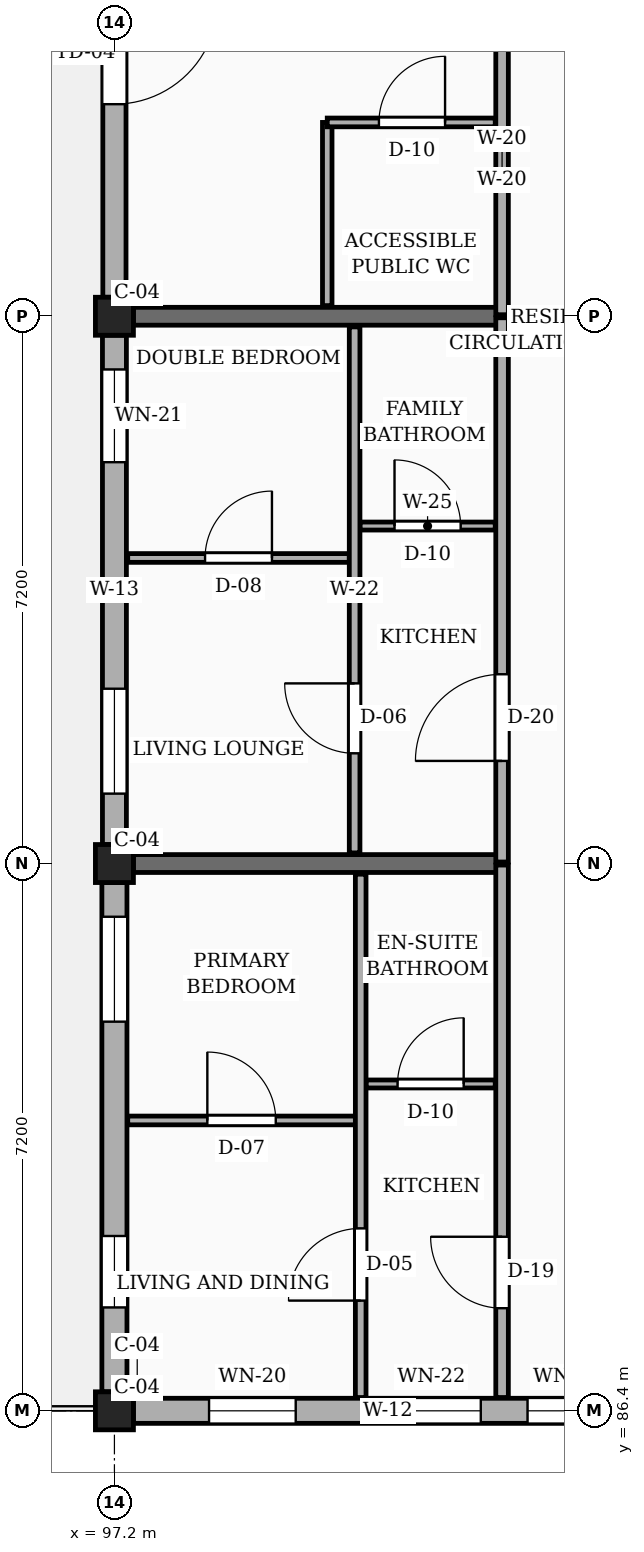
"""IFC4 building model, lengths in metres.
Left out: names, types, materials, properties, quantities, classifications, styles, units other than length and angle.
Written with IfcOpenShell. Run it as: python <this file> out.ifc"""

import sys

from ifc_helpers import new_model, si_unit, direction, frame, frame_2d, origin, origin_2d, place, context, subcontext, project, spatial, rectangle, extrude, element, fill, save


model = new_model("IFC4")
c1 = context("Model", 3, precision=1e-05, world=origin(), true_north=direction((0.0, 1.0)))
c2 = subcontext(c1, "Body", "Model", "MODEL_VIEW")
j1 = project(units=[si_unit("LENGTHUNIT", "METRE"), si_unit("PLANEANGLEUNIT", "RADIAN")], contexts=[c1])
p1 = place(None, origin())
s1 = spatial("IfcSite", under=j1, at=p1, CompositionType="ELEMENT")
p2 = place(p1, origin())
s2 = spatial("IfcBuilding", under=s1, at=p2, CompositionType="ELEMENT")
p3 = place(p2, frame((0.0, 0.0, 23.4)))
s3 = spatial("IfcBuildingStorey", under=s2, at=p3, CompositionType="ELEMENT", Elevation=23.4)
for number, where, z_axis, x_axis in (
    (1, (97.2, 86.4, 0.0), (0.0, 0.0, 1.0), (1.0, 0.0, 0.0)),
    (2, (97.2, 93.6, 0.0), (0.0, 0.0, 1.0), (1.0, 0.0, 0.0)),
    (3, (97.2, 100.8, 0.0), (0.0, 0.0, 1.0), (1.0, 0.0, 0.0)),
):
    element("IfcColumn", number, at=place(p3, frame(where, z_axis=z_axis, x_axis=x_axis)), inside=s3, PredefinedType="COLUMN", context=c2, shape_type="SweptSolid", body=[
        extrude(rectangle(XDim=0.5, YDim=0.5, at=origin_2d()), origin(), (0.0, 0.0, 1.0), 3.15),
    ])
for number, where, z_axis, x_axis in (
    (4, (97.45, 93.6, 0.0), (0.0, 0.0, 1.0), (1.0, 0.0, 0.0)),
    (5, (97.45, 100.8, 0.0), (0.0, 0.0, 1.0), (1.0, 0.0, 0.0)),
):
    element("IfcWall", number, at=place(p3, frame(where, z_axis=z_axis, x_axis=x_axis)), inside=s3, PredefinedType="SOLIDWALL", context=c2, shape_type="SweptSolid", body=[
        extrude(rectangle(XDim=4.85, YDim=0.235, at=frame_2d((2.425, 0.0))), origin(), (0.0, 0.0, 1.0), 2.19),
    ])
p4 = place(p3, frame((97.45, 86.4, 0.0), z_axis=(0.0, 0.0, 1.0), x_axis=(1.0, 0.0, 0.0)))
e6 = element("IfcWall", 6, at=p4, inside=s3, PredefinedType="SOLIDWALL", context=c2, shape_type="SweptSolid", body=[
    extrude(rectangle(XDim=6.7, YDim=0.33, at=frame_2d((3.35, 0.0))), origin(), (0.0, 0.0, 1.0), 2.46),
])
p5 = place(p4, frame((0.995, 0.0, 0.78)))
e7 = element("IfcOpeningElement", 7, at=p5, cuts=e6, PredefinedType="OPENING", context=c2, shape_type="SweptSolid", body=[
    extrude(rectangle(XDim=1.14, YDim=1.36, at=frame_2d((0.57, 0.68))), frame((0.0, 0.175, 0.0), z_axis=(0.0, -1.0, 0.0), x_axis=(1.0, 0.0, 0.0)), (0.0, 0.0, 1.0), 0.35),
])
p6 = place(p4, frame((3.27, 0.0, 0.78)))
e8 = element("IfcOpeningElement", 8, at=p6, cuts=e6, PredefinedType="OPENING", context=c2, shape_type="SweptSolid", body=[
    extrude(rectangle(XDim=1.3, YDim=1.36, at=frame_2d((0.65, 0.68))), frame((0.0, 0.175, 0.0), z_axis=(0.0, -1.0, 0.0), x_axis=(1.0, 0.0, 0.0)), (0.0, 0.0, 1.0), 0.35),
])
p7 = place(p4, frame((5.185, 0.0, 0.78)))
e9 = element("IfcOpeningElement", 9, at=p7, cuts=e6, PredefinedType="OPENING", context=c2, shape_type="SweptSolid", body=[
    extrude(rectangle(XDim=1.04, YDim=1.26, at=frame_2d((0.52, 0.63))), frame((0.0, 0.175, 0.0), z_axis=(0.0, -1.0, 0.0), x_axis=(1.0, 0.0, 0.0)), (0.0, 0.0, 1.0), 0.35),
])
p8 = place(p3, frame((97.2, 107.75, 0.0), z_axis=(0.0, 0.0, 1.0), x_axis=(0.0, -1.0, 0.0)))
e10 = element("IfcWall", 10, at=p8, inside=s3, PredefinedType="SOLIDWALL", context=c2, shape_type="SweptSolid", body=[
    extrude(rectangle(XDim=6.7, YDim=0.305, at=frame_2d((3.35, 0.0))), origin(), (0.0, 0.0, 1.0), 2.46),
])
p9 = place(p8, frame((2.8, 0.0, 0.0)))
e11 = element("IfcOpeningElement", 11, at=p9, cuts=e10, PredefinedType="OPENING", context=c2, shape_type="SweptSolid", body=[
    extrude(rectangle(XDim=1.36, YDim=2.12, at=frame_2d((0.68, 1.06))), frame((0.0, 0.163, 0.0), z_axis=(0.0, -1.0, 0.0), x_axis=(1.0, 0.0, 0.0)), (0.0, 0.0, 1.0), 0.325),
])
p10 = place(p8, frame((0.65, 0.0, 0.78)))
e12 = element("IfcOpeningElement", 12, at=p10, cuts=e10, PredefinedType="OPENING", context=c2, shape_type="SweptSolid", body=[
    extrude(rectangle(XDim=1.16, YDim=1.15, at=frame_2d((0.58, 0.575))), frame((0.0, 0.163, 0.0), z_axis=(0.0, -1.0, 0.0), x_axis=(1.0, 0.0, 0.0)), (0.0, 0.0, 1.0), 0.325),
])
p11 = place(p3, frame((97.2, 100.55, 0.0), z_axis=(0.0, 0.0, 1.0), x_axis=(0.0, -1.0, 0.0)))
e13 = element("IfcWall", 13, at=p11, inside=s3, PredefinedType="SOLIDWALL", context=c2, shape_type="SweptSolid", body=[
    extrude(rectangle(XDim=6.7, YDim=0.315, at=frame_2d((3.35, 0.0))), origin(), (0.0, 0.0, 1.0), 2.46),
])
p12 = place(p11, frame((0.45, 0.0, 0.78)))
e14 = element("IfcOpeningElement", 14, at=p12, cuts=e13, PredefinedType="OPENING", context=c2, shape_type="SweptSolid", body=[
    extrude(rectangle(XDim=1.22, YDim=1.36, at=frame_2d((0.61, 0.68))), frame((0.0, 0.167, 0.0), z_axis=(0.0, -1.0, 0.0), x_axis=(1.0, 0.0, 0.0)), (0.0, 0.0, 1.0), 0.335),
])
p13 = place(p11, frame((4.65, 0.0, 0.78)))
e15 = element("IfcOpeningElement", 15, at=p13, cuts=e13, PredefinedType="OPENING", context=c2, shape_type="SweptSolid", body=[
    extrude(rectangle(XDim=1.38, YDim=1.36, at=frame_2d((0.69, 0.68))), frame((0.0, 0.167, 0.0), z_axis=(0.0, -1.0, 0.0), x_axis=(1.0, 0.0, 0.0)), (0.0, 0.0, 1.0), 0.335),
])
p14 = place(p3, frame((97.2, 93.35, 0.0), z_axis=(0.0, 0.0, 1.0), x_axis=(0.0, -1.0, 0.0)))
e16 = element("IfcWall", 16, at=p14, inside=s3, PredefinedType="SOLIDWALL", context=c2, shape_type="SweptSolid", body=[
    extrude(rectangle(XDim=6.7, YDim=0.33, at=frame_2d((3.35, 0.0))), origin(), (0.0, 0.0, 1.0), 2.46),
])
p15 = place(p14, frame((0.45, 0.0, 0.78)))
e17 = element("IfcOpeningElement", 17, at=p15, cuts=e16, PredefinedType="OPENING", context=c2, shape_type="SweptSolid", body=[
    extrude(rectangle(XDim=1.38, YDim=1.36, at=frame_2d((0.69, 0.68))), frame((0.0, 0.175, 0.0), z_axis=(0.0, -1.0, 0.0), x_axis=(1.0, 0.0, 0.0)), (0.0, 0.0, 1.0), 0.35),
])
p16 = place(p14, frame((4.65, 0.0, 0.78)))
e18 = element("IfcOpeningElement", 18, at=p16, cuts=e16, PredefinedType="OPENING", context=c2, shape_type="SweptSolid", body=[
    extrude(rectangle(XDim=0.94, YDim=1.44, at=frame_2d((0.47, 0.72))), frame((0.0, 0.175, 0.0), z_axis=(0.0, -1.0, 0.0), x_axis=(1.0, 0.0, 0.0)), (0.0, 0.0, 1.0), 0.35),
])
p17 = place(p3, frame((102.3, 86.575, 0.0), z_axis=(0.0, 0.0, 1.0), x_axis=(0.0, 1.0, 0.0)))
e19 = element("IfcWall", 19, at=p17, inside=s3, PredefinedType="PARTITIONING", context=c2, shape_type="SweptSolid", body=[
    extrude(rectangle(XDim=7.005, YDim=0.165, at=frame_2d((3.502, 0.0))), origin(), (0.0, 0.0, 1.0), 2.325),
])
p18 = place(p17, frame((1.175, 0.0, 0.0)))
e20 = element("IfcOpeningElement", 20, at=p18, cuts=e19, PredefinedType="OPENING", context=c2, shape_type="SweptSolid", body=[
    extrude(rectangle(XDim=0.94, YDim=2.12, at=frame_2d((0.47, 1.06))), frame((0.0, 0.093, 0.0), z_axis=(0.0, -1.0, 0.0), x_axis=(1.0, 0.0, 0.0)), (0.0, 0.0, 1.0), 0.185),
])
p19 = place(p3, frame((102.3, 93.62, 0.0), z_axis=(0.0, 0.0, 1.0), x_axis=(0.0, 1.0, 0.0)))
e21 = element("IfcWall", 21, at=p19, inside=s3, PredefinedType="PARTITIONING", context=c2, shape_type="SweptSolid", body=[
    extrude(rectangle(XDim=7.16, YDim=0.165, at=frame_2d((3.58, 0.0))), origin(), (0.0, 0.0, 1.0), 2.325),
])
p20 = place(p19, frame((1.33, 0.0, 0.0)))
e22 = element("IfcOpeningElement", 22, at=p20, cuts=e21, PredefinedType="OPENING", context=c2, shape_type="SweptSolid", body=[
    extrude(rectangle(XDim=1.14, YDim=2.18, at=frame_2d((0.57, 1.09))), frame((0.0, 0.093, 0.0), z_axis=(0.0, -1.0, 0.0), x_axis=(1.0, 0.0, 0.0)), (0.0, 0.0, 1.0), 0.185),
])
p21 = place(p3, frame((102.3, 100.82, 0.0), z_axis=(0.0, 0.0, 1.0), x_axis=(0.0, 1.0, 0.0)))
e23 = element("IfcWall", 23, at=p21, inside=s3, PredefinedType="PARTITIONING", context=c2, shape_type="SweptSolid", body=[
    extrude(rectangle(XDim=7.16, YDim=0.165, at=frame_2d((3.58, 0.0))), origin(), (0.0, 0.0, 1.0), 2.325),
])
p22 = place(p21, frame((4.33, 0.0, 0.0)))
e24 = element("IfcOpeningElement", 24, at=p22, cuts=e23, PredefinedType="OPENING", context=c2, shape_type="SweptSolid", body=[
    extrude(rectangle(XDim=1.1, YDim=2.15, at=frame_2d((0.55, 1.075))), frame((0.0, 0.093, 0.0), z_axis=(0.0, -1.0, 0.0), x_axis=(1.0, 0.0, 0.0)), (0.0, 0.0, 1.0), 0.185),
])
p23 = place(p3, frame((97.375, 90.22, 0.0), z_axis=(0.0, 0.0, 1.0), x_axis=(1.0, 0.0, 0.0)))
e25 = element("IfcWall", 25, at=p23, inside=s3, PredefinedType="PARTITIONING", context=c2, shape_type="SweptSolid", body=[
    extrude(rectangle(XDim=2.995, YDim=0.115, at=frame_2d((1.498, 0.0))), origin(), (0.0, 0.0, 1.0), 2.325),
])
p24 = place(p23, frame((1.048, 0.0, 0.0)))
e26 = element("IfcOpeningElement", 26, at=p24, cuts=e25, PredefinedType="OPENING", context=c2, shape_type="SweptSolid", body=[
    extrude(rectangle(XDim=0.9, YDim=2.1, at=frame_2d((0.45, 1.05))), frame((0.0, 0.067, 0.0), z_axis=(0.0, -1.0, 0.0), x_axis=(1.0, 0.0, 0.0)), (0.0, 0.0, 1.0), 0.135),
])
p25 = place(p3, frame((100.51, 90.7, 0.0), z_axis=(0.0, 0.0, 1.0), x_axis=(1.0, 0.0, 0.0)))
e27 = element("IfcWall", 27, at=p25, inside=s3, PredefinedType="PARTITIONING", context=c2, shape_type="SweptSolid", body=[
    extrude(rectangle(XDim=1.7, YDim=0.105, at=frame_2d((0.85, 0.0))), origin(), (0.0, 0.0, 1.0), 2.325),
])
p26 = place(p25, frame((0.415, 0.0, 0.0)))
e28 = element("IfcOpeningElement", 28, at=p26, cuts=e27, PredefinedType="OPENING", context=c2, shape_type="SweptSolid", body=[
    extrude(rectangle(XDim=0.87, YDim=2.05, at=frame_2d((0.435, 1.025))), frame((0.0, 0.062, 0.0), z_axis=(0.0, -1.0, 0.0), x_axis=(1.0, 0.0, 0.0)), (0.0, 0.0, 1.0), 0.125),
])
p27 = place(p3, frame((100.44, 86.575, 0.0), z_axis=(0.0, 0.0, 1.0), x_axis=(0.0, 1.0, 0.0)))
e29 = element("IfcWall", 29, at=p27, inside=s3, PredefinedType="PARTITIONING", context=c2, shape_type="SweptSolid", body=[
    extrude(rectangle(XDim=6.885, YDim=0.14, at=frame_2d((3.442, 0.0))), origin(), (0.0, 0.0, 1.0), 2.325),
])
p28 = place(p27, frame((1.275, 0.0, 0.0)))
e30 = element("IfcOpeningElement", 30, at=p28, cuts=e29, PredefinedType="OPENING", context=c2, shape_type="SweptSolid", body=[
    extrude(rectangle(XDim=0.95, YDim=2.1, at=frame_2d((0.475, 1.05))), frame((0.0, 0.08, 0.0), z_axis=(0.0, -1.0, 0.0), x_axis=(1.0, 0.0, 0.0)), (0.0, 0.0, 1.0), 0.16),
])
p29 = place(p3, frame((97.375, 97.62, 0.0), z_axis=(0.0, 0.0, 1.0), x_axis=(1.0, 0.0, 0.0)))
e31 = element("IfcWall", 31, at=p29, inside=s3, PredefinedType="PARTITIONING", context=c2, shape_type="SweptSolid", body=[
    extrude(rectangle(XDim=2.915, YDim=0.115, at=frame_2d((1.458, 0.0))), origin(), (0.0, 0.0, 1.0), 2.325),
])
p30 = place(p29, frame((1.018, 0.0, 0.0)))
e32 = element("IfcOpeningElement", 32, at=p30, cuts=e31, PredefinedType="OPENING", context=c2, shape_type="SweptSolid", body=[
    extrude(rectangle(XDim=0.88, YDim=2.08, at=frame_2d((0.44, 1.04))), frame((0.0, 0.067, 0.0), z_axis=(0.0, -1.0, 0.0), x_axis=(1.0, 0.0, 0.0)), (0.0, 0.0, 1.0), 0.135),
])
p31 = place(p3, frame((100.43, 98.04, 0.0), z_axis=(0.0, 0.0, 1.0), x_axis=(1.0, 0.0, 0.0)))
e33 = element("IfcWall", 33, at=p31, inside=s3, PredefinedType="PARTITIONING", context=c2, shape_type="SweptSolid", body=[
    extrude(rectangle(XDim=1.78, YDim=0.105, at=frame_2d((0.89, 0.0))), origin(), (0.0, 0.0, 1.0), 2.325),
])
p32 = place(p31, frame((0.455, 0.0, 0.0)))
e34 = element("IfcOpeningElement", 34, at=p32, cuts=e33, PredefinedType="OPENING", context=c2, shape_type="SweptSolid", body=[
    extrude(rectangle(XDim=0.87, YDim=2.05, at=frame_2d((0.435, 1.025))), frame((0.0, 0.062, 0.0), z_axis=(0.0, -1.0, 0.0), x_axis=(1.0, 0.0, 0.0)), (0.0, 0.0, 1.0), 0.125),
])
p33 = place(p3, frame((100.36, 93.74, 0.0), z_axis=(0.0, 0.0, 1.0), x_axis=(0.0, 1.0, 0.0)))
e35 = element("IfcWall", 35, at=p33, inside=s3, PredefinedType="PARTITIONING", context=c2, shape_type="SweptSolid", body=[
    extrude(rectangle(XDim=6.92, YDim=0.14, at=frame_2d((3.46, 0.0))), origin(), (0.0, 0.0, 1.0), 2.325),
])
p34 = place(p33, frame((1.31, 0.0, 0.0)))
e36 = element("IfcOpeningElement", 36, at=p34, cuts=e35, PredefinedType="OPENING", context=c2, shape_type="SweptSolid", body=[
    extrude(rectangle(XDim=0.92, YDim=2.1, at=frame_2d((0.46, 1.05))), frame((0.0, 0.08, 0.0), z_axis=(0.0, -1.0, 0.0), x_axis=(1.0, 0.0, 0.0)), (0.0, 0.0, 1.0), 0.16),
])
p35 = place(p3, frame((100.0, 100.94, 0.0), z_axis=(0.0, 0.0, 1.0), x_axis=(0.0, 1.0, 0.0)))
e37 = element("IfcWall", 37, at=p35, inside=s3, PredefinedType="PARTITIONING", context=c2, shape_type="SweptSolid", body=[
    extrude(rectangle(XDim=2.41, YDim=0.125, at=frame_2d((1.205, 0.0))), origin(), (0.0, 0.0, 1.0), 2.325),
])
p36 = place(p3, frame((100.0, 103.35, 0.0), z_axis=(0.0, 0.0, 1.0), x_axis=(1.0, 0.0, 0.0)))
e38 = element("IfcWall", 38, at=p36, inside=s3, PredefinedType="PARTITIONING", context=c2, shape_type="SweptSolid", body=[
    extrude(rectangle(XDim=2.21, YDim=0.115, at=frame_2d((1.105, 0.0))), origin(), (0.0, 0.0, 1.0), 2.325),
])
p37 = place(p36, frame((0.68, 0.0, 0.0)))
e39 = element("IfcOpeningElement", 39, at=p37, cuts=e38, PredefinedType="OPENING", context=c2, shape_type="SweptSolid", body=[
    extrude(rectangle(XDim=0.87, YDim=2.05, at=frame_2d((0.435, 1.025))), frame((0.0, 0.067, 0.0), z_axis=(0.0, -1.0, 0.0), x_axis=(1.0, 0.0, 0.0)), (0.0, 0.0, 1.0), 0.135),
])
p38 = place(p5, origin())
e40 = element("IfcWindow", 40, at=p38, inside=s3, PartitioningType="SINGLE_PANEL", PredefinedType="WINDOW", context=c2, shape_type="SweptSolid", body=[
    extrude(rectangle(XDim=1.14, YDim=1.36, at=frame_2d((0.57, 0.68))), frame((0.0, 0.03, 0.0), z_axis=(0.0, -1.0, 0.0), x_axis=(1.0, 0.0, 0.0)), (0.0, 0.0, 1.0), 0.06),
])
fill(e7, e40)
p39 = place(p6, origin())
e41 = element("IfcWindow", 41, at=p39, inside=s3, PartitioningType="SINGLE_PANEL", PredefinedType="WINDOW", context=c2, shape_type="SweptSolid", body=[
    extrude(rectangle(XDim=1.3, YDim=1.36, at=frame_2d((0.65, 0.68))), frame((0.0, 0.03, 0.0), z_axis=(0.0, -1.0, 0.0), x_axis=(1.0, 0.0, 0.0)), (0.0, 0.0, 1.0), 0.06),
])
fill(e8, e41)
p40 = place(p7, origin())
e42 = element("IfcWindow", 42, at=p40, inside=s3, PartitioningType="SINGLE_PANEL", PredefinedType="WINDOW", context=c2, shape_type="SweptSolid", body=[
    extrude(rectangle(XDim=1.04, YDim=1.26, at=frame_2d((0.52, 0.63))), frame((0.0, 0.03, 0.0), z_axis=(0.0, -1.0, 0.0), x_axis=(1.0, 0.0, 0.0)), (0.0, 0.0, 1.0), 0.06),
])
fill(e9, e42)
p41 = place(p9, frame((1.36, 0.0, 0.0), z_axis=(0.0, 0.0, 1.0), x_axis=(-1.0, 0.0, 0.0)))
e43 = element("IfcDoor", 43, at=p41, inside=s3, OperationType="SINGLE_SWING_LEFT", PredefinedType="DOOR", context=c2, shape_type="SweptSolid", body=[
    extrude(rectangle(XDim=1.36, YDim=2.12, at=frame_2d((0.68, 1.06))), frame((0.0, 0.025, 0.0), z_axis=(0.0, -1.0, 0.0), x_axis=(1.0, 0.0, 0.0)), (0.0, 0.0, 1.0), 0.05),
])
fill(e11, e43)
p42 = place(p12, origin())
e44 = element("IfcWindow", 44, at=p42, inside=s3, PartitioningType="SINGLE_PANEL", PredefinedType="WINDOW", context=c2, shape_type="SweptSolid", body=[
    extrude(rectangle(XDim=1.22, YDim=1.36, at=frame_2d((0.61, 0.68))), frame((0.0, 0.03, 0.0), z_axis=(0.0, -1.0, 0.0), x_axis=(1.0, 0.0, 0.0)), (0.0, 0.0, 1.0), 0.06),
])
fill(e14, e44)
p43 = place(p13, origin())
e45 = element("IfcWindow", 45, at=p43, inside=s3, PartitioningType="SINGLE_PANEL", PredefinedType="WINDOW", context=c2, shape_type="SweptSolid", body=[
    extrude(rectangle(XDim=1.38, YDim=1.36, at=frame_2d((0.69, 0.68))), frame((0.0, 0.03, 0.0), z_axis=(0.0, -1.0, 0.0), x_axis=(1.0, 0.0, 0.0)), (0.0, 0.0, 1.0), 0.06),
])
fill(e15, e45)
p44 = place(p15, origin())
e46 = element("IfcWindow", 46, at=p44, inside=s3, PartitioningType="SINGLE_PANEL", PredefinedType="WINDOW", context=c2, shape_type="SweptSolid", body=[
    extrude(rectangle(XDim=1.38, YDim=1.36, at=frame_2d((0.69, 0.68))), frame((0.0, 0.03, 0.0), z_axis=(0.0, -1.0, 0.0), x_axis=(1.0, 0.0, 0.0)), (0.0, 0.0, 1.0), 0.06),
])
fill(e17, e46)
p45 = place(p16, origin())
e47 = element("IfcWindow", 47, at=p45, inside=s3, PartitioningType="SINGLE_PANEL", PredefinedType="WINDOW", context=c2, shape_type="SweptSolid", body=[
    extrude(rectangle(XDim=0.94, YDim=1.44, at=frame_2d((0.47, 0.72))), frame((0.0, 0.03, 0.0), z_axis=(0.0, -1.0, 0.0), x_axis=(1.0, 0.0, 0.0)), (0.0, 0.0, 1.0), 0.06),
])
fill(e18, e47)
p46 = place(p18, origin())
e48 = element("IfcDoor", 48, at=p46, inside=s3, OperationType="SINGLE_SWING_RIGHT", PredefinedType="DOOR", context=c2, shape_type="SweptSolid", body=[
    extrude(rectangle(XDim=0.94, YDim=2.12, at=frame_2d((0.47, 1.06))), frame((0.0, 0.025, 0.0), z_axis=(0.0, -1.0, 0.0), x_axis=(1.0, 0.0, 0.0)), (0.0, 0.0, 1.0), 0.05),
])
fill(e20, e48)
p47 = place(p20, origin())
e49 = element("IfcDoor", 49, at=p47, inside=s3, OperationType="SINGLE_SWING_LEFT", PredefinedType="DOOR", context=c2, shape_type="SweptSolid", body=[
    extrude(rectangle(XDim=1.14, YDim=2.18, at=frame_2d((0.57, 1.09))), frame((0.0, 0.025, 0.0), z_axis=(0.0, -1.0, 0.0), x_axis=(1.0, 0.0, 0.0)), (0.0, 0.0, 1.0), 0.05),
])
fill(e22, e49)
p48 = place(p24, origin())
e50 = element("IfcDoor", 50, at=p48, inside=s3, OperationType="SINGLE_SWING_LEFT", PredefinedType="DOOR", context=c2, shape_type="SweptSolid", body=[
    extrude(rectangle(XDim=0.9, YDim=2.1, at=frame_2d((0.45, 1.05))), frame((0.0, 0.025, 0.0), z_axis=(0.0, -1.0, 0.0), x_axis=(1.0, 0.0, 0.0)), (0.0, 0.0, 1.0), 0.05),
])
fill(e26, e50)
p49 = place(p26, origin())
e51 = element("IfcDoor", 51, at=p49, inside=s3, OperationType="SINGLE_SWING_RIGHT", PredefinedType="DOOR", context=c2, shape_type="SweptSolid", body=[
    extrude(rectangle(XDim=0.87, YDim=2.05, at=frame_2d((0.435, 1.025))), frame((0.0, 0.025, 0.0), z_axis=(0.0, -1.0, 0.0), x_axis=(1.0, 0.0, 0.0)), (0.0, 0.0, 1.0), 0.05),
])
fill(e28, e51)
p50 = place(p28, origin())
e52 = element("IfcDoor", 52, at=p50, inside=s3, OperationType="SINGLE_SWING_LEFT", PredefinedType="DOOR", context=c2, shape_type="SweptSolid", body=[
    extrude(rectangle(XDim=0.95, YDim=2.1, at=frame_2d((0.475, 1.05))), frame((0.0, 0.025, 0.0), z_axis=(0.0, -1.0, 0.0), x_axis=(1.0, 0.0, 0.0)), (0.0, 0.0, 1.0), 0.05),
])
fill(e30, e52)
p51 = place(p30, origin())
e53 = element("IfcDoor", 53, at=p51, inside=s3, OperationType="SINGLE_SWING_RIGHT", PredefinedType="DOOR", context=c2, shape_type="SweptSolid", body=[
    extrude(rectangle(XDim=0.88, YDim=2.08, at=frame_2d((0.44, 1.04))), frame((0.0, 0.025, 0.0), z_axis=(0.0, -1.0, 0.0), x_axis=(1.0, 0.0, 0.0)), (0.0, 0.0, 1.0), 0.05),
])
fill(e32, e53)
p52 = place(p32, origin())
e54 = element("IfcDoor", 54, at=p52, inside=s3, OperationType="SINGLE_SWING_LEFT", PredefinedType="DOOR", context=c2, shape_type="SweptSolid", body=[
    extrude(rectangle(XDim=0.87, YDim=2.05, at=frame_2d((0.435, 1.025))), frame((0.0, 0.025, 0.0), z_axis=(0.0, -1.0, 0.0), x_axis=(1.0, 0.0, 0.0)), (0.0, 0.0, 1.0), 0.05),
])
fill(e34, e54)
p53 = place(p34, origin())
e55 = element("IfcDoor", 55, at=p53, inside=s3, OperationType="SINGLE_SWING_RIGHT", PredefinedType="DOOR", context=c2, shape_type="SweptSolid", body=[
    extrude(rectangle(XDim=0.92, YDim=2.1, at=frame_2d((0.46, 1.05))), frame((0.0, 0.025, 0.0), z_axis=(0.0, -1.0, 0.0), x_axis=(1.0, 0.0, 0.0)), (0.0, 0.0, 1.0), 0.05),
])
fill(e36, e55)
p54 = place(p37, origin())
e56 = element("IfcDoor", 56, at=p54, inside=s3, OperationType="SINGLE_SWING_RIGHT", PredefinedType="DOOR", context=c2, shape_type="SweptSolid", body=[
    extrude(rectangle(XDim=0.87, YDim=2.05, at=frame_2d((0.435, 1.025))), frame((0.0, 0.025, 0.0), z_axis=(0.0, -1.0, 0.0), x_axis=(1.0, 0.0, 0.0)), (0.0, 0.0, 1.0), 0.05),
])
fill(e39, e56)
save(model, sys.argv[1])
